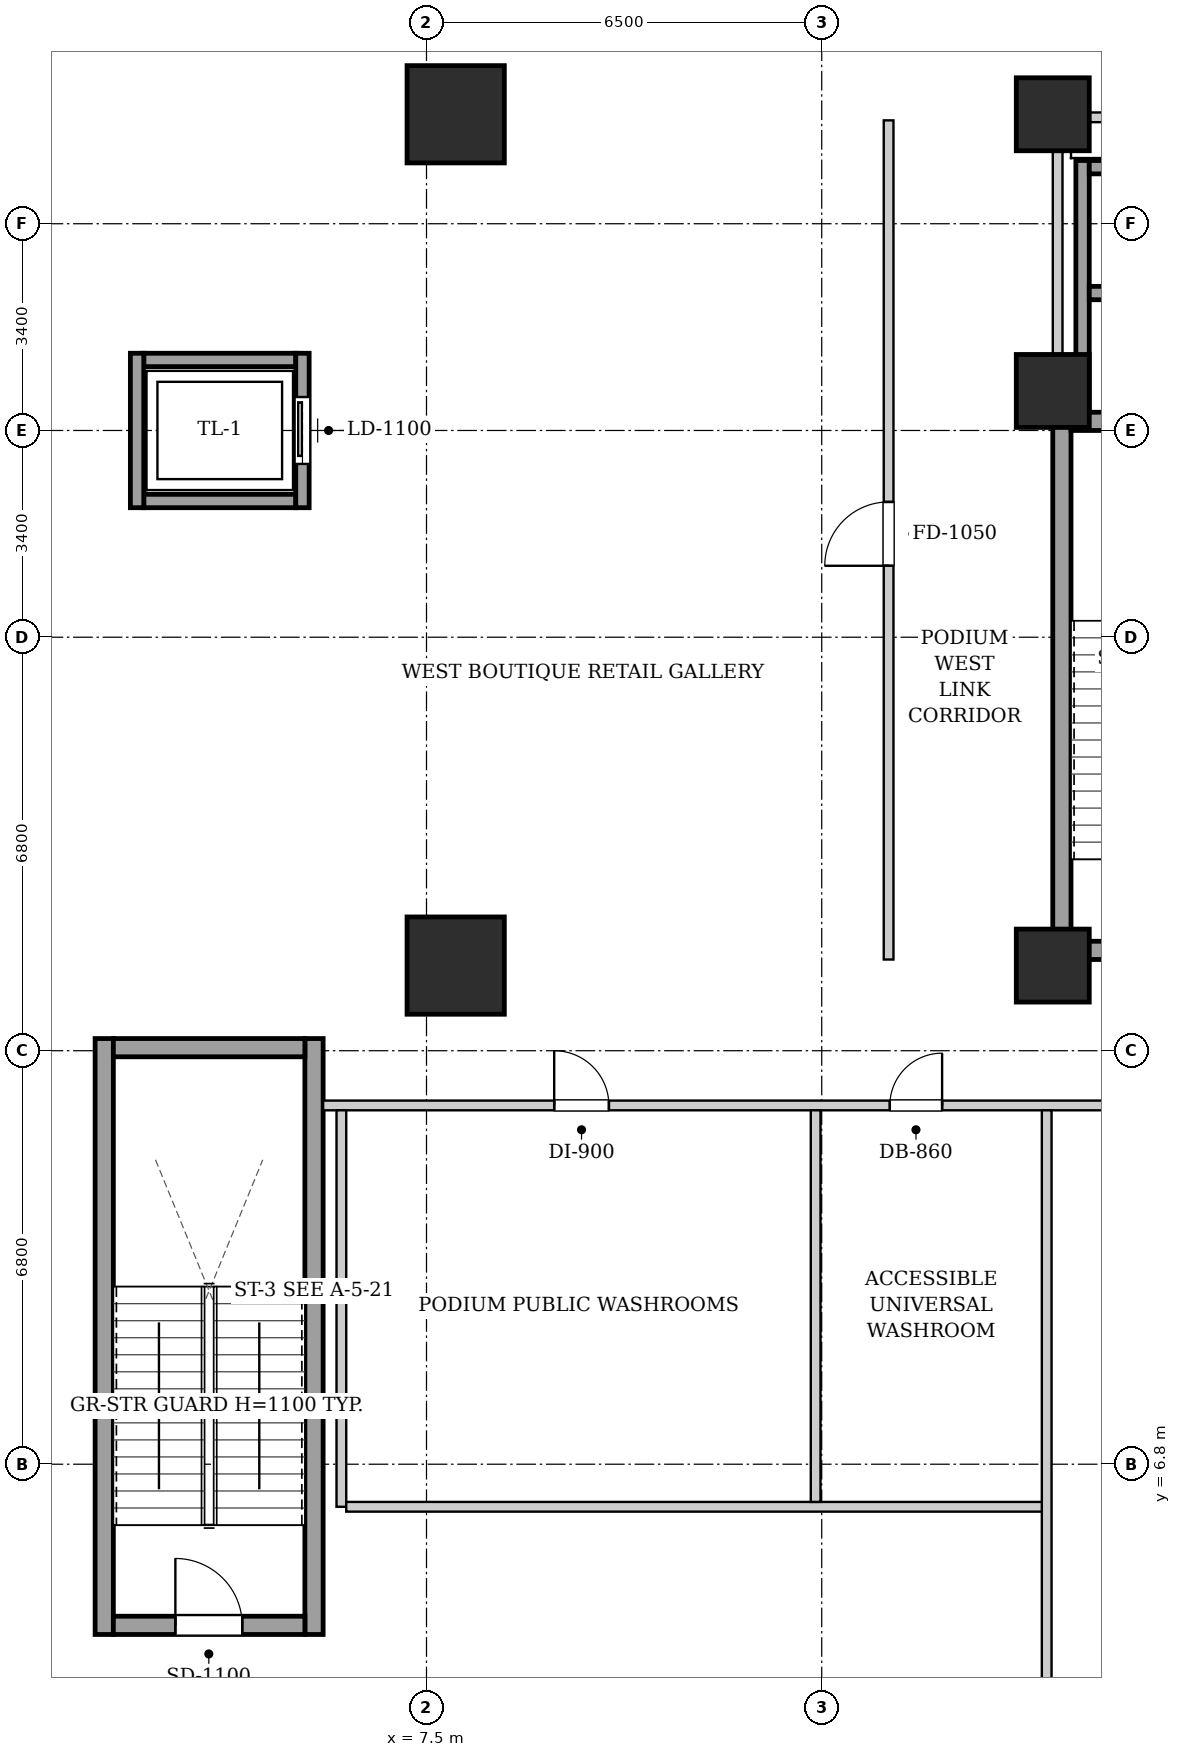
"""IFC4 building model, lengths in metres.
Left out: names, types, materials, properties, quantities, classifications, styles, units other than length and angle.
Written with IfcOpenShell. Run it as: python <this file> out.ifc"""

import sys

from ifc_helpers import new_model, si_unit, direction, frame, frame_2d, origin, origin_2d, place, context, subcontext, project, spatial, rectangle, extrude, element, fill, save


model = new_model("IFC4")
c1 = context("Model", 3, precision=1e-05, world=origin(), true_north=direction((0.0, 1.0)))
c2 = subcontext(c1, "Body", "Model", "MODEL_VIEW")
j1 = project(units=[si_unit("LENGTHUNIT", "METRE"), si_unit("PLANEANGLEUNIT", "RADIAN")], contexts=[c1])
p1 = place(None, origin())
s1 = spatial("IfcSite", under=j1, at=p1, CompositionType="ELEMENT")
p2 = place(p1, origin())
s2 = spatial("IfcBuilding", under=s1, at=p2, CompositionType="ELEMENT")
p3 = place(p2, frame((0.0, 0.0, 6.0)))
s3 = spatial("IfcBuildingStorey", under=s2, at=p3, CompositionType="ELEMENT", Elevation=6.0)
for number, where, z_axis, x_axis in (
    (1, (7.98, 15.0, 0.0), (0.0, 0.0, 1.0), (1.0, 0.0, 0.0)),
    (2, (7.98, 29.0, 0.0), (0.0, 0.0, 1.0), (1.0, 0.0, 0.0)),
):
    element("IfcColumn", number, at=place(p3, frame(where, z_axis=z_axis, x_axis=x_axis)), inside=s3, PredefinedType="COLUMN", context=c2, shape_type="SweptSolid", body=[
        extrude(rectangle(XDim=1.6, YDim=1.6, at=origin_2d()), origin(), (0.0, 0.0, 1.0), 5.2),
    ])
for number, where, z_axis, x_axis in (
    (3, (17.8, 15.0, 0.0), (0.0, 0.0, 1.0), (1.0, 0.0, 0.0)),
    (4, (17.8, 29.0, 0.0), (0.0, 0.0, 1.0), (1.0, 0.0, 0.0)),
    (5, (17.8, 24.45, 0.0), (0.0, 0.0, 1.0), (1.0, 0.0, 0.0)),
):
    element("IfcColumn", number, at=place(p3, frame(where, z_axis=z_axis, x_axis=x_axis)), inside=s3, PredefinedType="COLUMN", context=c2, shape_type="SweptSolid", body=[
        extrude(rectangle(XDim=1.2, YDim=1.2, at=origin_2d()), origin(), (0.0, 0.0, 1.0), 5.2),
    ])
p4 = place(p3, frame((17.95, 15.1, 0.0), z_axis=(0.0, 0.0, 1.0), x_axis=(0.0, 1.0, 0.0)))
e6 = element("IfcWall", 6, at=p4, inside=s3, PredefinedType="SHEAR", context=c2, shape_type="SweptSolid", body=[
    extrude(rectangle(XDim=9.0, YDim=0.3, at=frame_2d((4.5, 0.0))), origin(), (0.0, 0.0, 1.0), 4.88),
])
p5 = place(p3, frame((18.1, 23.95, 0.0), z_axis=(0.0, 0.0, 1.0), x_axis=(1.0, 0.0, 0.0)))
e7 = element("IfcWall", 7, at=p5, inside=s3, PredefinedType="SHEAR", context=c2, shape_type="SweptSolid", body=[
    extrude(rectangle(XDim=2.85, YDim=0.3, at=frame_2d((1.425, 0.0))), origin(), (0.0, 0.0, 1.0), 4.88),
])
p6 = place(p3, frame((18.1, 15.25, 0.0), z_axis=(0.0, 0.0, 1.0), x_axis=(1.0, 0.0, 0.0)))
e8 = element("IfcWall", 8, at=p6, inside=s3, PredefinedType="SHEAR", context=c2, shape_type="SweptSolid", body=[
    extrude(rectangle(XDim=2.85, YDim=0.3, at=frame_2d((1.425, 0.0))), origin(), (0.0, 0.0, 1.0), 4.88),
])
p7 = place(p6, frame((0.86, 0.0, 0.0)))
e9 = element("IfcOpeningElement", 9, at=p7, cuts=e8, PredefinedType="OPENING", context=c2, shape_type="SweptSolid", body=[
    extrude(rectangle(XDim=1.1, YDim=2.05, at=frame_2d((0.55, 1.025))), frame((0.0, 0.16, 0.0), z_axis=(0.0, -1.0, 0.0), x_axis=(1.0, 0.0, 0.0)), (0.0, 0.0, 1.0), 0.32),
])
for number, where, z_axis, x_axis in (
    (10, (2.2, 4.0, 0.0), (0.0, 0.0, 1.0), (0.0, 1.0, 0.0)),
    (11, (5.65, 4.0, 0.0), (0.0, 0.0, 1.0), (0.0, 1.0, 0.0)),
):
    element("IfcWall", number, at=place(p3, frame(where, z_axis=z_axis, x_axis=x_axis)), inside=s3, PredefinedType="SHEAR", context=c2, shape_type="SweptSolid", body=[
        extrude(rectangle(XDim=9.8, YDim=0.3, at=frame_2d((4.9, 0.0))), origin(), (0.0, 0.0, 1.0), 4.88),
    ])
p8 = place(p3, frame((2.35, 13.65, 0.0), z_axis=(0.0, 0.0, 1.0), x_axis=(1.0, 0.0, 0.0)))
e12 = element("IfcWall", 12, at=p8, inside=s3, PredefinedType="SHEAR", context=c2, shape_type="SweptSolid", body=[
    extrude(rectangle(XDim=3.15, YDim=0.3, at=frame_2d((1.575, 0.0))), origin(), (0.0, 0.0, 1.0), 4.88),
])
p9 = place(p3, frame((2.35, 4.15, 0.0), z_axis=(0.0, 0.0, 1.0), x_axis=(1.0, 0.0, 0.0)))
e13 = element("IfcWall", 13, at=p9, inside=s3, PredefinedType="SHEAR", context=c2, shape_type="SweptSolid", body=[
    extrude(rectangle(XDim=3.15, YDim=0.3, at=frame_2d((1.575, 0.0))), origin(), (0.0, 0.0, 1.0), 4.88),
])
p10 = place(p9, frame((1.02, 0.0, 0.0)))
e14 = element("IfcOpeningElement", 14, at=p10, cuts=e13, PredefinedType="OPENING", context=c2, shape_type="SweptSolid", body=[
    extrude(rectangle(XDim=1.1, YDim=2.05, at=frame_2d((0.55, 1.025))), frame((0.0, 0.16, 0.0), z_axis=(0.0, -1.0, 0.0), x_axis=(1.0, 0.0, 0.0)), (0.0, 0.0, 1.0), 0.32),
])
p11 = place(p3, frame((18.29, 24.1, 0.0), z_axis=(0.0, 0.0, 1.0), x_axis=(0.0, 1.0, 0.0)))
e15 = element("IfcWall", 15, at=p11, inside=s3, PredefinedType="SHEAR", context=c2, shape_type="SweptSolid", body=[
    extrude(rectangle(XDim=4.14, YDim=0.22, at=frame_2d((2.07, 0.0))), origin(), (0.0, 0.0, 1.0), 4.88),
])
for number, where, z_axis, x_axis in (
    (16, (18.4, 26.06, 0.0), (0.0, 0.0, 1.0), (1.0, 0.0, 0.0)),
    (17, (18.4, 28.13, 0.0), (0.0, 0.0, 1.0), (1.0, 0.0, 0.0)),
):
    element("IfcWall", number, at=place(p3, frame(where, z_axis=z_axis, x_axis=x_axis)), inside=s3, PredefinedType="SHEAR", context=c2, shape_type="SweptSolid", body=[
        extrude(rectangle(XDim=1.9, YDim=0.22, at=frame_2d((0.95, 0.0))), origin(), (0.0, 0.0, 1.0), 4.88),
    ])
for number, where, z_axis, x_axis in (
    (18, (2.85, 22.64, 0.0), (0.0, 0.0, 1.0), (1.0, 0.0, 0.0)),
    (19, (2.85, 24.96, 0.0), (0.0, 0.0, 1.0), (1.0, 0.0, 0.0)),
):
    element("IfcWall", number, at=place(p3, frame(where, z_axis=z_axis, x_axis=x_axis)), inside=s3, PredefinedType="SHEAR", context=c2, shape_type="SweptSolid", body=[
        extrude(rectangle(XDim=2.5, YDim=0.22, at=frame_2d((1.25, 0.0))), origin(), (0.0, 0.0, 1.0), 4.88),
    ])
p12 = place(p3, frame((2.74, 22.53, 0.0), z_axis=(0.0, 0.0, 1.0), x_axis=(0.0, 1.0, 0.0)))
e20 = element("IfcWall", 20, at=p12, inside=s3, PredefinedType="SHEAR", context=c2, shape_type="SweptSolid", body=[
    extrude(rectangle(XDim=2.54, YDim=0.22, at=frame_2d((1.27, 0.0))), origin(), (0.0, 0.0, 1.0), 4.88),
])
p13 = place(p3, frame((5.46, 22.53, 0.0), z_axis=(0.0, 0.0, 1.0), x_axis=(0.0, 1.0, 0.0)))
e21 = element("IfcWall", 21, at=p13, inside=s3, PredefinedType="SHEAR", context=c2, shape_type="SweptSolid", body=[
    extrude(rectangle(XDim=2.54, YDim=0.22, at=frame_2d((1.27, 0.0))), origin(), (0.0, 0.0, 1.0), 4.88),
])
p14 = place(p13, frame((0.72, 0.0, 0.0)))
e22 = element("IfcOpeningElement", 22, at=p14, cuts=e21, PredefinedType="OPENING", context=c2, shape_type="SweptSolid", body=[
    extrude(rectangle(XDim=1.1, YDim=2.15, at=frame_2d((0.55, 1.075))), frame((0.0, 0.12, 0.0), z_axis=(0.0, -1.0, 0.0), x_axis=(1.0, 0.0, 0.0)), (0.0, 0.0, 1.0), 0.24),
])
p15 = place(p3, frame((17.88, 24.12, 0.0), z_axis=(0.0, 0.0, 1.0), x_axis=(0.0, 1.0, 0.0)))
e23 = element("IfcWall", 23, at=p15, inside=s3, PredefinedType="PARTITIONING", context=c2, shape_type="SweptSolid", body=[
    extrude(rectangle(XDim=4.76, YDim=0.16, at=frame_2d((2.38, 0.0))), origin(), (0.0, 0.0, 1.0), 4.88),
])
p16 = place(p3, frame((17.96, 28.95, 0.0), z_axis=(0.0, 0.0, 1.0), x_axis=(1.0, 0.0, 0.0)))
e24 = element("IfcWall", 24, at=p16, inside=s3, PredefinedType="PARTITIONING", context=c2, shape_type="SweptSolid", body=[
    extrude(rectangle(XDim=4.29, YDim=0.16, at=frame_2d((2.145, 0.0))), origin(), (0.0, 0.0, 1.0), 4.88),
])
p17 = place(p16, frame((1.57, 0.0, 0.0)))
e25 = element("IfcOpeningElement", 25, at=p17, cuts=e24, PredefinedType="OPENING", context=c2, shape_type="SweptSolid", body=[
    extrude(rectangle(XDim=0.86, YDim=2.05, at=frame_2d((0.43, 1.025))), frame((0.0, 0.09, 0.0), z_axis=(0.0, -1.0, 0.0), x_axis=(1.0, 0.0, 0.0)), (0.0, 0.0, 1.0), 0.18),
])
p18 = place(p3, frame((5.8, 12.7, 0.0), z_axis=(0.0, 0.0, 1.0), x_axis=(1.0, 0.0, 0.0)))
e26 = element("IfcWall", 26, at=p18, inside=s3, PredefinedType="PARTITIONING", context=c2, shape_type="SweptSolid", body=[
    extrude(rectangle(XDim=47.92, YDim=0.16, at=frame_2d((23.96, 0.0))), origin(), (0.0, 0.0, 1.0), 4.88),
])
p19 = place(p18, frame((3.8, 0.0, 0.0)))
e27 = element("IfcOpeningElement", 27, at=p19, cuts=e26, PredefinedType="OPENING", context=c2, shape_type="SweptSolid", body=[
    extrude(rectangle(XDim=0.9, YDim=2.05, at=frame_2d((0.45, 1.025))), frame((0.0, 0.09, 0.0), z_axis=(0.0, -1.0, 0.0), x_axis=(1.0, 0.0, 0.0)), (0.0, 0.0, 1.0), 0.18),
])
p20 = place(p18, frame((9.32, 0.0, 0.0)))
e28 = element("IfcOpeningElement", 28, at=p20, cuts=e26, PredefinedType="OPENING", context=c2, shape_type="SweptSolid", body=[
    extrude(rectangle(XDim=0.86, YDim=2.05, at=frame_2d((0.43, 1.025))), frame((0.0, 0.09, 0.0), z_axis=(0.0, -1.0, 0.0), x_axis=(1.0, 0.0, 0.0)), (0.0, 0.0, 1.0), 0.18),
])
p21 = place(p18, frame((18.975, 0.0, 0.0)))
e29 = element("IfcOpeningElement", 29, at=p21, cuts=e26, PredefinedType="OPENING", context=c2, shape_type="SweptSolid", body=[
    extrude(rectangle(XDim=1.05, YDim=2.05, at=frame_2d((0.525, 1.025))), frame((0.0, 0.09, 0.0), z_axis=(0.0, -1.0, 0.0), x_axis=(1.0, 0.0, 0.0)), (0.0, 0.0, 1.0), 0.18),
])
p22 = place(p18, frame((35.725, 0.0, 0.0)))
e30 = element("IfcOpeningElement", 30, at=p22, cuts=e26, PredefinedType="OPENING", context=c2, shape_type="SweptSolid", body=[
    extrude(rectangle(XDim=1.05, YDim=2.05, at=frame_2d((0.525, 1.025))), frame((0.0, 0.09, 0.0), z_axis=(0.0, -1.0, 0.0), x_axis=(1.0, 0.0, 0.0)), (0.0, 0.0, 1.0), 0.18),
])
p23 = place(p3, frame((6.1, 6.1, 0.0), z_axis=(0.0, 0.0, 1.0), x_axis=(0.0, 1.0, 0.0)))
e31 = element("IfcWall", 31, at=p23, inside=s3, PredefinedType="PARTITIONING", context=c2, shape_type="SweptSolid", body=[
    extrude(rectangle(XDim=6.52, YDim=0.16, at=frame_2d((3.26, 0.0))), origin(), (0.0, 0.0, 1.0), 4.88),
])
p24 = place(p3, frame((6.18, 6.1, 0.0), z_axis=(0.0, 0.0, 1.0), x_axis=(1.0, 0.0, 0.0)))
e32 = element("IfcWall", 32, at=p24, inside=s3, PredefinedType="PARTITIONING", context=c2, shape_type="SweptSolid", body=[
    extrude(rectangle(XDim=11.5, YDim=0.16, at=frame_2d((5.75, 0.0))), origin(), (0.0, 0.0, 1.0), 4.88),
])
p25 = place(p3, frame((13.9, 6.18, 0.0), z_axis=(0.0, 0.0, 1.0), x_axis=(0.0, 1.0, 0.0)))
e33 = element("IfcWall", 33, at=p25, inside=s3, PredefinedType="PARTITIONING", context=c2, shape_type="SweptSolid", body=[
    extrude(rectangle(XDim=6.44, YDim=0.16, at=frame_2d((3.22, 0.0))), origin(), (0.0, 0.0, 1.0), 4.88),
])
p26 = place(p3, frame((17.7, 0.6, 0.0), z_axis=(0.0, 0.0, 1.0), x_axis=(0.0, 1.0, 0.0)))
e34 = element("IfcWall", 34, at=p26, inside=s3, PredefinedType="PARTITIONING", context=c2, shape_type="SweptSolid", body=[
    extrude(rectangle(XDim=12.02, YDim=0.16, at=frame_2d((6.01, 0.0))), origin(), (0.0, 0.0, 1.0), 3.765),
])
p27 = place(p3, frame((15.1, 15.1, 0.0), z_axis=(0.0, 0.0, 1.0), x_axis=(0.0, 1.0, 0.0)))
e35 = element("IfcWall", 35, at=p27, inside=s3, PredefinedType="PARTITIONING", context=c2, shape_type="SweptSolid", body=[
    extrude(rectangle(XDim=13.8, YDim=0.16, at=frame_2d((6.9, 0.0))), origin(), (0.0, 0.0, 1.0), 4.88),
])
p28 = place(p27, frame((6.475, 0.0, 0.0)))
e36 = element("IfcOpeningElement", 36, at=p28, cuts=e35, PredefinedType="OPENING", context=c2, shape_type="SweptSolid", body=[
    extrude(rectangle(XDim=1.05, YDim=2.05, at=frame_2d((0.525, 1.025))), frame((0.0, 0.09, 0.0), z_axis=(0.0, -1.0, 0.0), x_axis=(1.0, 0.0, 0.0)), (0.0, 0.0, 1.0), 0.18),
])
p29 = place(p10, origin())
e37 = element("IfcDoor", 37, at=p29, inside=s3, OperationType="SINGLE_SWING_LEFT", PredefinedType="DOOR", context=c2, shape_type="SweptSolid", body=[
    extrude(rectangle(XDim=1.1, YDim=2.05, at=frame_2d((0.55, 1.025))), frame((0.0, 0.025, 0.0), z_axis=(0.0, -1.0, 0.0), x_axis=(1.0, 0.0, 0.0)), (0.0, 0.0, 1.0), 0.05),
])
fill(e14, e37)
p30 = place(p14, origin())
e38 = element("IfcDoor", 38, at=p30, inside=s3, OperationType="SLIDING_TO_LEFT", PredefinedType="DOOR", context=c2, shape_type="SweptSolid", body=[
    extrude(rectangle(XDim=1.1, YDim=2.15, at=frame_2d((0.55, 1.075))), frame((0.0, 0.025, 0.0), z_axis=(0.0, -1.0, 0.0), x_axis=(1.0, 0.0, 0.0)), (0.0, 0.0, 1.0), 0.05),
])
fill(e22, e38)
p31 = place(p19, origin())
e39 = element("IfcDoor", 39, at=p31, inside=s3, OperationType="SINGLE_SWING_LEFT", PredefinedType="DOOR", context=c2, shape_type="SweptSolid", body=[
    extrude(rectangle(XDim=0.9, YDim=2.05, at=frame_2d((0.45, 1.025))), frame((0.0, 0.025, 0.0), z_axis=(0.0, -1.0, 0.0), x_axis=(1.0, 0.0, 0.0)), (0.0, 0.0, 1.0), 0.05),
])
fill(e27, e39)
p32 = place(p20, origin())
e40 = element("IfcDoor", 40, at=p32, inside=s3, OperationType="SINGLE_SWING_RIGHT", PredefinedType="DOOR", context=c2, shape_type="SweptSolid", body=[
    extrude(rectangle(XDim=0.86, YDim=2.05, at=frame_2d((0.43, 1.025))), frame((0.0, 0.025, 0.0), z_axis=(0.0, -1.0, 0.0), x_axis=(1.0, 0.0, 0.0)), (0.0, 0.0, 1.0), 0.05),
])
fill(e28, e40)
p33 = place(p28, origin())
e41 = element("IfcDoor", 41, at=p33, inside=s3, OperationType="SINGLE_SWING_LEFT", PredefinedType="DOOR", context=c2, shape_type="SweptSolid", body=[
    extrude(rectangle(XDim=1.05, YDim=2.05, at=frame_2d((0.525, 1.025))), frame((0.0, 0.025, 0.0), z_axis=(0.0, -1.0, 0.0), x_axis=(1.0, 0.0, 0.0)), (0.0, 0.0, 1.0), 0.05),
])
fill(e36, e41)
save(model, sys.argv[1])
